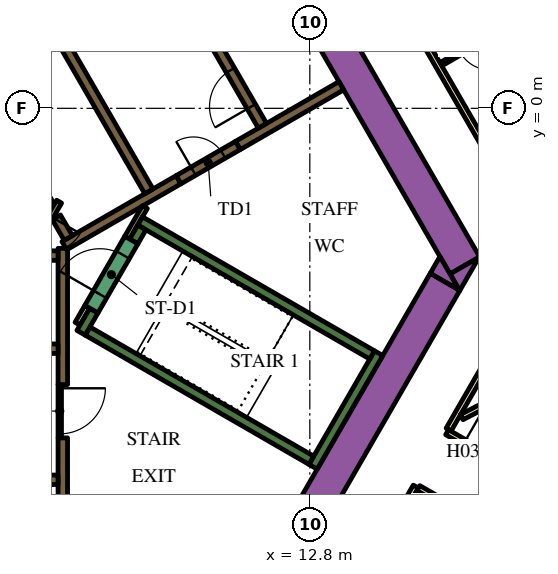
"""IFC4 building model, lengths in metres.
Left out: names, types, materials, properties, quantities, classifications, styles, units other than length and angle.
Written with IfcOpenShell. Run it as: python <this file> out.ifc"""

import sys

from ifc_helpers import new_model, si_unit, direction, frame, frame_2d, origin, place, context, subcontext, project, spatial, polyline, rectangle, outline, extrude, element, fill, save


model = new_model("IFC4")
c1 = context("Model", 3, precision=1e-05, world=origin(), true_north=direction((0.0, 1.0)))
c2 = subcontext(c1, "Body", "Model", "MODEL_VIEW")
j1 = project(units=[si_unit("LENGTHUNIT", "METRE"), si_unit("PLANEANGLEUNIT", "RADIAN")], contexts=[c1])
p1 = place(None, origin())
s1 = spatial("IfcSite", under=j1, at=p1, CompositionType="ELEMENT")
p2 = place(p1, origin())
s2 = spatial("IfcBuilding", under=s1, at=p2, CompositionType="ELEMENT")
p3 = place(p2, frame((0.0, 0.0, 51.0)))
s3 = spatial("IfcBuildingStorey", under=s2, at=p3, CompositionType="ELEMENT", Elevation=51.0)
p4 = place(p3, frame((6.776, 13.364, 0.0), z_axis=(0.0, 0.0, 1.0), x_axis=(0.500004177138, -0.8660229921, 0.0)))
e1 = element("IfcWall", 1, at=p4, inside=s3, PredefinedType="SOLIDWALL", context=c2, shape_type="SweptSolid", body=[
    extrude(rectangle(XDim=20.204, YDim=0.9, at=frame_2d((10.102, 0.0))), origin(), (0.0, 0.0, 1.0), 3.9),
])
p5 = place(p3, origin())
e2 = element("IfcWall", 2, at=p5, inside=s3, PredefinedType="SOLIDWALL", context=c2, shape_type="SweptSolid", body=[
    extrude(outline(polyline([(16.743, -4.8), (16.489, -4.36), (17.251, -3.92), (16.743, -4.8)])), origin(), (0.0, 0.0, 1.0), 3.9),
])
p6 = place(p3, frame((11.943, -12.214, 0.0), z_axis=(0.0, 0.0, 1.0), x_axis=(0.49998092645, 0.866036415623, 0.0)))
e3 = element("IfcWall", 3, at=p6, inside=s3, PredefinedType="SOLIDWALL", context=c2, shape_type="SweptSolid", body=[
    extrude(rectangle(XDim=8.83, YDim=0.9, at=frame_2d((4.415, 0.0))), origin(), (0.0, 0.0, 1.0), 3.9),
])
e4 = element("IfcWall", 4, at=p5, inside=s3, PredefinedType="SOLIDWALL", context=c2, shape_type="SweptSolid", body=[
    extrude(outline(polyline([(16.223, -3.9), (16.732, -4.78), (15.969, -4.34), (16.223, -3.9)])), origin(), (0.0, 0.0, 1.0), 3.9),
])
p7 = place(p3, frame((12.885, -9.431, 0.0), z_axis=(0.0, 0.0, 1.0), x_axis=(0.500020560727, 0.866013532718, 0.0)))
e5 = element("IfcWall", 5, at=p7, inside=s3, PredefinedType="SOLIDWALL", context=c2, shape_type="SweptSolid", body=[
    extrude(rectangle(XDim=3.45, YDim=0.25, at=frame_2d((1.725, 0.0))), origin(), (0.0, 0.0, 1.0), 3.9),
])
p8 = place(p3, frame((12.84, -9.261, 0.0), z_axis=(0.0, 0.0, 1.0), x_axis=(-0.866013990052, 0.500019768644, 0.0)))
e6 = element("IfcWall", 6, at=p8, inside=s3, PredefinedType="SOLIDWALL", context=c2, shape_type="SweptSolid", body=[
    extrude(rectangle(XDim=6.8, YDim=0.25, at=frame_2d((3.4, 0.0))), origin(), (0.0, 0.0, 1.0), 3.9),
])
p9 = place(p3, frame((6.78, -5.906, 0.0), z_axis=(0.0, 0.0, 1.0), x_axis=(0.500223362819, 0.865896406789, 0.0)))
e7 = element("IfcWall", 7, at=p9, inside=s3, PredefinedType="SOLIDWALL", context=c2, shape_type="SweptSolid", body=[
    extrude(rectangle(XDim=0.675, YDim=0.25, at=frame_2d((0.337, 0.0))), origin(), (0.0, 0.0, 1.0), 3.9),
])
p10 = place(p3, frame((8.334, -2.964, 0.0), z_axis=(0.0, 0.0, 1.0), x_axis=(0.866016039709, -0.500016218704, 0.0)))
e8 = element("IfcWall", 8, at=p10, inside=s3, PredefinedType="SOLIDWALL", context=c2, shape_type="SweptSolid", body=[
    extrude(rectangle(XDim=7.05, YDim=0.25, at=frame_2d((3.525, 0.0))), origin(), (0.0, 0.0, 1.0), 3.9),
])
p11 = place(p3, frame((8.168, -3.503, 0.0), z_axis=(0.0, 0.0, 1.0), x_axis=(0.49972245349, 0.866185586049, 0.0)))
e9 = element("IfcWall", 9, at=p11, inside=s3, PredefinedType="SOLIDWALL", context=c2, shape_type="SweptSolid", body=[
    extrude(rectangle(XDim=0.425, YDim=0.25, at=frame_2d((0.212, 0.0))), origin(), (0.0, 0.0, 1.0), 3.9),
])
p12 = place(p3, frame((6.3, -7.27, 0.0), z_axis=(0.0, 0.0, 1.0), x_axis=(0.0, 1.0, 0.0)))
e10 = element("IfcWall", 10, at=p12, inside=s3, PredefinedType="SOLIDWALL", context=c2, shape_type="SweptSolid", body=[
    extrude(rectangle(XDim=3.586, YDim=0.25, at=frame_2d((1.793, 0.0))), origin(), (0.0, 0.0, 1.0), 3.9),
])
p13 = place(p3, frame((6.3, -12.1, 0.0), z_axis=(0.0, 0.0, 1.0), x_axis=(0.0, 1.0, 0.0)))
e11 = element("IfcWall", 11, at=p13, inside=s3, PredefinedType="SOLIDWALL", context=c2, shape_type="SweptSolid", body=[
    extrude(rectangle(XDim=3.428, YDim=0.25, at=frame_2d((1.714, 0.0))), origin(), (0.0, 0.0, 1.0), 3.9),
])
p14 = place(p3, frame((5.538, -3.875, 0.0), z_axis=(0.0, 0.0, 1.0), x_axis=(1.0, 0.0, 0.0)))
e12 = element("IfcWall", 12, at=p14, inside=s3, PredefinedType="SOLIDWALL", context=c2, shape_type="SweptSolid", body=[
    extrude(rectangle(XDim=0.637, YDim=0.25, at=frame_2d((0.318, 0.0))), origin(), (0.0, 0.0, 1.0), 3.9),
])
p15 = place(p3, frame((13.629, 0.594, 0.0), z_axis=(0.0, 0.0, 1.0), x_axis=(-0.86602790099, -0.499995674689, 0.0)))
e13 = element("IfcWall", 13, at=p15, inside=s3, PredefinedType="SOLIDWALL", context=c2, shape_type="SweptSolid", body=[
    extrude(rectangle(XDim=3.146, YDim=0.25, at=frame_2d((1.573, 0.0))), origin(), (0.0, 0.0, 1.0), 3.9),
])
p16 = place(p3, frame((9.346, -1.879, 0.0), z_axis=(0.0, 0.0, 1.0), x_axis=(-0.866048528039, -0.499959945477, 0.0)))
e14 = element("IfcWall", 14, at=p16, inside=s3, PredefinedType="SOLIDWALL", context=c2, shape_type="SweptSolid", body=[
    extrude(rectangle(XDim=3.47, YDim=0.25, at=frame_2d((1.735, 0.0))), origin(), (0.0, 0.0, 1.0), 3.9),
])
p17 = place(p3, frame((6.13, -2.867, 0.0), z_axis=(0.0, 0.0, 1.0), x_axis=(0.500160776593, -0.865932559475, 0.0)))
e15 = element("IfcWall", 15, at=p17, inside=s3, PredefinedType="SOLIDWALL", context=c2, shape_type="SweptSolid", body=[
    extrude(rectangle(XDim=0.627, YDim=0.25, at=frame_2d((0.313, 0.0))), origin(), (0.0, 0.0, 1.0), 3.9),
])
p18 = place(p3, frame((5.97, -2.591, 0.0), z_axis=(0.0, 0.0, 1.0), x_axis=(-0.499994469932, 0.866028596547, 0.0)))
e16 = element("IfcWall", 16, at=p18, inside=s3, PredefinedType="SOLIDWALL", context=c2, shape_type="SweptSolid", body=[
    extrude(rectangle(XDim=10.488, YDim=0.25, at=frame_2d((5.244, 0.0))), origin(), (0.0, 0.0, 1.0), 3.9),
])
p19 = place(p3, frame((6.945, -5.222, 0.0), z_axis=(0.0, 0.0, 1.0), x_axis=(-0.499818422106, -0.866130212453, 0.0)))
e17 = element("IfcWall", 17, at=p19, inside=s3, PredefinedType="PARTITIONING", context=c2, shape_type="SweptSolid", body=[
    extrude(rectangle(XDim=0.514, YDim=0.15, at=frame_2d((0.257, 0.0))), origin(), (0.0, 0.0, 1.0), 2.75),
])
p20 = place(p3, frame((8.459, -2.599, 0.0), z_axis=(0.0, 0.0, 1.0), x_axis=(-0.500041054325, -0.866001699761, 0.0)))
e18 = element("IfcWall", 18, at=p20, inside=s3, PredefinedType="PARTITIONING", context=c2, shape_type="SweptSolid", body=[
    extrude(rectangle(XDim=0.929, YDim=0.15, at=frame_2d((0.464, 0.0))), origin(), (0.0, 0.0, 1.0), 3.9),
])
p21 = place(p3, frame((-6.175, -9.775, 0.0), z_axis=(0.0, 0.0, 1.0), x_axis=(1.0, 0.0, 0.0)))
e19 = element("IfcWall", 19, at=p21, inside=s3, PredefinedType="SOLIDWALL", context=c2, shape_type="SweptSolid", body=[
    extrude(rectangle(XDim=12.35, YDim=0.25, at=frame_2d((6.175, 0.0))), origin(), (0.0, 0.0, 1.0), 3.9),
])
p22 = place(p21, frame((0.585, 0.0, 0.0)))
e20 = element("IfcOpeningElement", 20, at=p22, cuts=e19, PredefinedType="OPENING", context=c2, shape_type="SweptSolid", body=[
    extrude(rectangle(XDim=1.1, YDim=2.1, at=frame_2d((0.55, 1.05))), frame((0.0, 0.135, 0.0), z_axis=(0.0, -1.0, 0.0), x_axis=(1.0, 0.0, 0.0)), (0.0, 0.0, 1.0), 0.27),
])
p23 = place(p21, frame((3.105, 0.0, 0.0)))
e21 = element("IfcOpeningElement", 21, at=p23, cuts=e19, PredefinedType="OPENING", context=c2, shape_type="SweptSolid", body=[
    extrude(rectangle(XDim=1.1, YDim=2.1, at=frame_2d((0.55, 1.05))), frame((0.0, 0.135, 0.0), z_axis=(0.0, -1.0, 0.0), x_axis=(1.0, 0.0, 0.0)), (0.0, 0.0, 1.0), 0.27),
])
p24 = place(p21, frame((5.625, 0.0, 0.0)))
e22 = element("IfcOpeningElement", 22, at=p24, cuts=e19, PredefinedType="OPENING", context=c2, shape_type="SweptSolid", body=[
    extrude(rectangle(XDim=1.1, YDim=2.1, at=frame_2d((0.55, 1.05))), frame((0.0, 0.135, 0.0), z_axis=(0.0, -1.0, 0.0), x_axis=(1.0, 0.0, 0.0)), (0.0, 0.0, 1.0), 0.27),
])
p25 = place(p21, frame((8.145, 0.0, 0.0)))
e23 = element("IfcOpeningElement", 23, at=p25, cuts=e19, PredefinedType="OPENING", context=c2, shape_type="SweptSolid", body=[
    extrude(rectangle(XDim=1.1, YDim=2.1, at=frame_2d((0.55, 1.05))), frame((0.0, 0.135, 0.0), z_axis=(0.0, -1.0, 0.0), x_axis=(1.0, 0.0, 0.0)), (0.0, 0.0, 1.0), 0.27),
])
p26 = place(p21, frame((10.665, 0.0, 0.0)))
e24 = element("IfcOpeningElement", 24, at=p26, cuts=e19, PredefinedType="OPENING", context=c2, shape_type="SweptSolid", body=[
    extrude(rectangle(XDim=1.1, YDim=2.1, at=frame_2d((0.55, 1.05))), frame((0.0, 0.135, 0.0), z_axis=(0.0, -1.0, 0.0), x_axis=(1.0, 0.0, 0.0)), (0.0, 0.0, 1.0), 0.27),
])
p27 = place(p3, frame((-6.175, -6.325, 0.0), z_axis=(0.0, 0.0, 1.0), x_axis=(1.0, 0.0, 0.0)))
e25 = element("IfcWall", 25, at=p27, inside=s3, PredefinedType="SOLIDWALL", context=c2, shape_type="SweptSolid", body=[
    extrude(rectangle(XDim=12.35, YDim=0.25, at=frame_2d((6.175, 0.0))), origin(), (0.0, 0.0, 1.0), 3.9),
])
p28 = place(p27, frame((3.205, 0.0, 0.0)))
e26 = element("IfcOpeningElement", 26, at=p28, cuts=e25, PredefinedType="OPENING", context=c2, shape_type="SweptSolid", body=[
    extrude(rectangle(XDim=0.9, YDim=2.1, at=frame_2d((0.45, 1.05))), frame((0.0, 0.135, 0.0), z_axis=(0.0, -1.0, 0.0), x_axis=(1.0, 0.0, 0.0)), (0.0, 0.0, 1.0), 0.27),
])
p29 = place(p27, frame((8.145, 0.0, 0.0)))
e27 = element("IfcOpeningElement", 27, at=p29, cuts=e25, PredefinedType="OPENING", context=c2, shape_type="SweptSolid", body=[
    extrude(rectangle(XDim=1.1, YDim=2.1, at=frame_2d((0.55, 1.05))), frame((0.0, 0.135, 0.0), z_axis=(0.0, -1.0, 0.0), x_axis=(1.0, 0.0, 0.0)), (0.0, 0.0, 1.0), 0.27),
])
p30 = place(p27, frame((10.665, 0.0, 0.0)))
e28 = element("IfcOpeningElement", 28, at=p30, cuts=e25, PredefinedType="OPENING", context=c2, shape_type="SweptSolid", body=[
    extrude(rectangle(XDim=1.1, YDim=2.1, at=frame_2d((0.55, 1.05))), frame((0.0, 0.135, 0.0), z_axis=(0.0, -1.0, 0.0), x_axis=(1.0, 0.0, 0.0)), (0.0, 0.0, 1.0), 0.27),
])
p31 = place(p3, frame((11.553, -0.46, 0.0), z_axis=(0.0, 0.0, 1.0), x_axis=(-0.500006514828, 0.866021642414, 0.0)))
e29 = element("IfcWall", 29, at=p31, inside=s3, PredefinedType="SOLIDWALL", context=c2, shape_type="SweptSolid", body=[
    extrude(rectangle(XDim=12.35, YDim=0.25, at=frame_2d((6.175, 0.0))), origin(), (0.0, 0.0, 1.0), 3.9),
])
p32 = place(p31, frame((0.585, 0.0, 0.0)))
e30 = element("IfcOpeningElement", 30, at=p32, cuts=e29, PredefinedType="OPENING", context=c2, shape_type="SweptSolid", body=[
    extrude(rectangle(XDim=1.1, YDim=2.1, at=frame_2d((0.55, 1.05))), frame((0.0, 0.135, 0.0), z_axis=(0.0, -1.0, 0.0), x_axis=(1.0, 0.0, 0.0)), (0.0, 0.0, 1.0), 0.27),
])
p33 = place(p31, frame((3.105, 0.0, 0.0)))
e31 = element("IfcOpeningElement", 31, at=p33, cuts=e29, PredefinedType="OPENING", context=c2, shape_type="SweptSolid", body=[
    extrude(rectangle(XDim=1.1, YDim=2.1, at=frame_2d((0.55, 1.05))), frame((0.0, 0.135, 0.0), z_axis=(0.0, -1.0, 0.0), x_axis=(1.0, 0.0, 0.0)), (0.0, 0.0, 1.0), 0.27),
])
p34 = place(p31, frame((5.625, 0.0, 0.0)))
e32 = element("IfcOpeningElement", 32, at=p34, cuts=e29, PredefinedType="OPENING", context=c2, shape_type="SweptSolid", body=[
    extrude(rectangle(XDim=1.1, YDim=2.1, at=frame_2d((0.55, 1.05))), frame((0.0, 0.135, 0.0), z_axis=(0.0, -1.0, 0.0), x_axis=(1.0, 0.0, 0.0)), (0.0, 0.0, 1.0), 0.27),
])
p35 = place(p3, frame((8.565, -2.185, 0.0), z_axis=(0.0, 0.0, 1.0), x_axis=(-0.499997954832, 0.866026584559, 0.0)))
e33 = element("IfcWall", 33, at=p35, inside=s3, PredefinedType="SOLIDWALL", context=c2, shape_type="SweptSolid", body=[
    extrude(rectangle(XDim=12.35, YDim=0.25, at=frame_2d((6.175, 0.0))), origin(), (0.0, 0.0, 1.0), 3.9),
])
p36 = place(p35, frame((5.725, 0.0, 0.0)))
e34 = element("IfcOpeningElement", 34, at=p36, cuts=e33, PredefinedType="OPENING", context=c2, shape_type="SweptSolid", body=[
    extrude(rectangle(XDim=0.9, YDim=2.1, at=frame_2d((0.45, 1.05))), frame((0.0, 0.135, 0.0), z_axis=(0.0, -1.0, 0.0), x_axis=(1.0, 0.0, 0.0)), (0.0, 0.0, 1.0), 0.27),
])
p37 = place(p3, frame((7.053, -5.284, 0.0), z_axis=(0.0, 0.0, 1.0), x_axis=(0.500078061341, 0.865980330357, 0.0)))
e35 = element("IfcWall", 35, at=p37, inside=s3, PredefinedType="SOLIDWALL", context=c2, shape_type="SweptSolid", body=[
    extrude(rectangle(XDim=2.1, YDim=0.4, at=frame_2d((1.05, 0.0))), origin(), (0.0, 0.0, 1.0), 3.9),
])
p38 = place(p37, frame((0.45, 0.0, 0.0)))
e36 = element("IfcOpeningElement", 36, at=p38, cuts=e35, PredefinedType="OPENING", context=c2, shape_type="SweptSolid", body=[
    extrude(rectangle(XDim=1.2, YDim=2.1, at=frame_2d((0.6, 1.05))), frame((0.0, 0.21, 0.0), z_axis=(0.0, -1.0, 0.0), x_axis=(1.0, 0.0, 0.0)), (0.0, 0.0, 1.0), 0.42),
])
p39 = place(p3, frame((9.346, -1.879, 0.0), z_axis=(0.0, 0.0, 1.0), x_axis=(0.866047807691, 0.499961193289, 0.0)))
e37 = element("IfcWall", 37, at=p39, inside=s3, PredefinedType="SOLIDWALL", context=c2, shape_type="SweptSolid", body=[
    extrude(rectangle(XDim=1.8, YDim=0.25, at=frame_2d((0.9, 0.0))), origin(), (0.0, 0.0, 1.0), 3.9),
])
p40 = place(p39, frame((0.45, 0.0, 0.0)))
e38 = element("IfcOpeningElement", 38, at=p40, cuts=e37, PredefinedType="OPENING", context=c2, shape_type="SweptSolid", body=[
    extrude(rectangle(XDim=0.9, YDim=2.1, at=frame_2d((0.45, 1.05))), frame((0.0, 0.135, 0.0), z_axis=(0.0, -1.0, 0.0), x_axis=(1.0, 0.0, 0.0)), (0.0, 0.0, 1.0), 0.27),
])
p41 = place(p3, frame((6.203, -2.456, 0.0), z_axis=(0.0, 0.0, 1.0), x_axis=(-0.500043961785, -0.866000020948, 0.0)))
e39 = element("IfcWall", 39, at=p41, inside=s3, PredefinedType="PARTITIONING", context=c2, shape_type="SweptSolid", body=[
    extrude(rectangle(XDim=1.95, YDim=0.15, at=frame_2d((0.975, 0.0))), origin(), (0.0, 0.0, 1.0), 3.9),
])
p42 = place(p41, frame((0.45, 0.0, 0.0)))
e40 = element("IfcOpeningElement", 40, at=p42, cuts=e39, PredefinedType="OPENING", context=c2, shape_type="SweptSolid", body=[
    extrude(rectangle(XDim=0.9, YDim=2.1, at=frame_2d((0.45, 1.05))), frame((0.0, 0.085, 0.0), z_axis=(0.0, -1.0, 0.0), x_axis=(1.0, 0.0, 0.0)), (0.0, 0.0, 1.0), 0.17),
])
p43 = place(p3, frame((6.22, -7.266, 0.0), z_axis=(0.0, 0.0, 1.0), x_axis=(0.0, -1.0, 0.0)))
e41 = element("IfcWall", 41, at=p43, inside=s3, PredefinedType="PARTITIONING", context=c2, shape_type="SweptSolid", body=[
    extrude(rectangle(XDim=1.4, YDim=0.09, at=frame_2d((0.7, 0.0))), origin(), (0.0, 0.0, 1.0), 2.75),
])
p44 = place(p43, frame((0.1, 0.0, 0.0)))
e42 = element("IfcOpeningElement", 42, at=p44, cuts=e41, PredefinedType="OPENING", context=c2, shape_type="SweptSolid", body=[
    extrude(rectangle(XDim=1.2, YDim=2.1, at=frame_2d((0.6, 1.05))), frame((0.0, 0.055, 0.0), z_axis=(0.0, -1.0, 0.0), x_axis=(1.0, 0.0, 0.0)), (0.0, 0.0, 1.0), 0.11),
])
p45 = place(p3, frame((16.412, -8.523, 0.0), z_axis=(0.0, 0.0, 1.0), x_axis=(0.866022197818, -0.500005552856, 0.0)))
e43 = element("IfcWall", 43, at=p45, inside=s3, PredefinedType="PARTITIONING", context=c2, shape_type="SweptSolid", body=[
    extrude(rectangle(XDim=16.224, YDim=0.15, at=frame_2d((8.112, 0.0))), origin(), (0.0, 0.0, 1.0), 2.75),
])
p46 = place(p45, frame((7.949, 0.0, 0.0)))
e44 = element("IfcOpeningElement", 44, at=p46, cuts=e43, PredefinedType="OPENING", context=c2, shape_type="SweptSolid", body=[
    extrude(rectangle(XDim=1.0, YDim=2.1, at=frame_2d((0.5, 1.05))), frame((0.0, 0.085, 0.0), z_axis=(0.0, -1.0, 0.0), x_axis=(1.0, 0.0, 0.0)), (0.0, 0.0, 1.0), 0.17),
])
p47 = place(p45, frame((0.526, 0.0, 0.0)))
e45 = element("IfcOpeningElement", 45, at=p47, cuts=e43, PredefinedType="OPENING", context=c2, shape_type="SweptSolid", body=[
    extrude(rectangle(XDim=1.0, YDim=2.1, at=frame_2d((0.5, 1.05))), frame((0.0, 0.085, 0.0), z_axis=(0.0, -1.0, 0.0), x_axis=(1.0, 0.0, 0.0)), (0.0, 0.0, 1.0), 0.17),
])
p48 = place(p3, frame((19.081, -3.9, 0.0), z_axis=(0.0, 0.0, 1.0), x_axis=(-0.499974327079, -0.866040225545, 0.0)))
e46 = element("IfcWall", 46, at=p48, inside=s3, PredefinedType="PARTITIONING", context=c2, shape_type="SweptSolid", body=[
    extrude(rectangle(XDim=5.258, YDim=0.15, at=frame_2d((2.629, 0.0))), origin(), (0.0, 0.0, 1.0), 2.75),
])
p49 = place(p3, frame((6.163, 18.475, 0.0), z_axis=(0.0, 0.0, 1.0), x_axis=(0.500001317485, -0.866024643133, 0.0)))
e47 = element("IfcWall", 47, at=p49, inside=s3, PredefinedType="PARTITIONING", context=c2, shape_type="SweptSolid", body=[
    extrude(rectangle(XDim=25.767, YDim=0.15, at=frame_2d((12.883, 0.0))), origin(), (0.0, 0.0, 1.0), 2.75),
])
p50 = place(p49, frame((24.586, 0.0, 0.0)))
e48 = element("IfcOpeningElement", 48, at=p50, cuts=e47, PredefinedType="OPENING", context=c2, shape_type="SweptSolid", body=[
    extrude(rectangle(XDim=1.0, YDim=2.1, at=frame_2d((0.5, 1.05))), frame((0.0, 0.085, 0.0), z_axis=(0.0, -1.0, 0.0), x_axis=(1.0, 0.0, 0.0)), (0.0, 0.0, 1.0), 0.17),
])
p51 = place(p49, frame((13.144, 0.0, 0.0)))
e49 = element("IfcOpeningElement", 49, at=p51, cuts=e47, PredefinedType="OPENING", context=c2, shape_type="SweptSolid", body=[
    extrude(rectangle(XDim=1.0, YDim=2.1, at=frame_2d((0.5, 1.05))), frame((0.0, 0.085, 0.0), z_axis=(0.0, -1.0, 0.0), x_axis=(1.0, 0.0, 0.0)), (0.0, 0.0, 1.0), 0.17),
])
p52 = place(p49, frame((11.692, 0.0, 0.0)))
e50 = element("IfcOpeningElement", 50, at=p52, cuts=e47, PredefinedType="OPENING", context=c2, shape_type="SweptSolid", body=[
    extrude(rectangle(XDim=1.0, YDim=2.1, at=frame_2d((0.5, 1.05))), frame((0.0, 0.085, 0.0), z_axis=(0.0, -1.0, 0.0), x_axis=(1.0, 0.0, 0.0)), (0.0, 0.0, 1.0), 0.17),
])
p53 = place(p49, frame((0.572, 0.0, 0.0)))
e51 = element("IfcOpeningElement", 51, at=p53, cuts=e47, PredefinedType="OPENING", context=c2, shape_type="SweptSolid", body=[
    extrude(rectangle(XDim=1.0, YDim=2.1, at=frame_2d((0.5, 1.05))), frame((0.0, 0.085, 0.0), z_axis=(0.0, -1.0, 0.0), x_axis=(1.0, 0.0, 0.0)), (0.0, 0.0, 1.0), 0.17),
])
p54 = place(p3, frame((15.587, -9.952, 0.0), z_axis=(0.0, 0.0, 1.0), x_axis=(-0.500016618951, -0.866015808616, 0.0)))
e52 = element("IfcWall", 52, at=p54, inside=s3, PredefinedType="PARTITIONING", context=c2, shape_type="SweptSolid", body=[
    extrude(rectangle(XDim=5.268, YDim=0.15, at=frame_2d((2.634, 0.0))), origin(), (0.0, 0.0, 1.0), 2.75),
])
p55 = place(p3, frame((29.638, -18.064, 0.0), z_axis=(0.0, 0.0, 1.0), x_axis=(-0.866026175601, 0.499998663172, 0.0)))
e53 = element("IfcWall", 53, at=p55, inside=s3, PredefinedType="PARTITIONING", context=c2, shape_type="SweptSolid", body=[
    extrude(rectangle(XDim=16.144, YDim=0.15, at=frame_2d((8.072, 0.0))), origin(), (0.0, 0.0, 1.0), 2.75),
])
p56 = place(p55, frame((14.714, 0.0, 0.0)))
e54 = element("IfcOpeningElement", 54, at=p56, cuts=e53, PredefinedType="OPENING", context=c2, shape_type="SweptSolid", body=[
    extrude(rectangle(XDim=1.0, YDim=2.1, at=frame_2d((0.5, 1.05))), frame((0.0, 0.085, 0.0), z_axis=(0.0, -1.0, 0.0), x_axis=(1.0, 0.0, 0.0)), (0.0, 0.0, 1.0), 0.17),
])
p57 = place(p55, frame((7.275, 0.0, 0.0)))
e55 = element("IfcOpeningElement", 55, at=p57, cuts=e53, PredefinedType="OPENING", context=c2, shape_type="SweptSolid", body=[
    extrude(rectangle(XDim=1.0, YDim=2.1, at=frame_2d((0.5, 1.05))), frame((0.0, 0.085, 0.0), z_axis=(0.0, -1.0, 0.0), x_axis=(1.0, 0.0, 0.0)), (0.0, 0.0, 1.0), 0.17),
])
p58 = place(p3, frame((27.134, -2.779, 0.0), z_axis=(0.0, 0.0, 1.0), x_axis=(-0.8882049501, -0.459447457951, 0.0)))
e56 = element("IfcWall", 56, at=p58, inside=s3, PredefinedType="PARTITIONING", context=c2, shape_type="SweptSolid", body=[
    extrude(rectangle(XDim=11.638, YDim=0.15, at=frame_2d((5.819, 0.0))), origin(), (0.0, 0.0, 1.0), 2.75),
])
p59 = place(p3, frame((18.586, 2.509, 0.0), z_axis=(0.0, 0.0, 1.0), x_axis=(-0.866059108428, -0.4999416173, 0.0)))
e57 = element("IfcWall", 57, at=p59, inside=s3, PredefinedType="PARTITIONING", context=c2, shape_type="SweptSolid", body=[
    extrude(rectangle(XDim=2.7, YDim=0.1, at=frame_2d((1.35, 0.0))), origin(), (0.0, 0.0, 1.0), 2.75),
])
p60 = place(p59, frame((1.2, 0.0, 0.0)))
e58 = element("IfcOpeningElement", 58, at=p60, cuts=e57, PredefinedType="OPENING", context=c2, shape_type="SweptSolid", body=[
    extrude(rectangle(XDim=0.9, YDim=2.1, at=frame_2d((0.45, 1.05))), frame((0.0, 0.06, 0.0), z_axis=(0.0, -1.0, 0.0), x_axis=(1.0, 0.0, 0.0)), (0.0, 0.0, 1.0), 0.12),
])
p61 = place(p32, origin())
e59 = element("IfcDoor", 59, at=p61, inside=s3, OperationType="DOUBLE_DOOR_SLIDING", PredefinedType="DOOR", context=c2, shape_type="SweptSolid", body=[
    extrude(rectangle(XDim=1.1, YDim=2.1, at=frame_2d((0.55, 1.05))), frame((0.0, 0.025, 0.0), z_axis=(0.0, -1.0, 0.0), x_axis=(1.0, 0.0, 0.0)), (0.0, 0.0, 1.0), 0.05),
])
fill(e30, e59)
p62 = place(p38, origin())
e60 = element("IfcDoor", 60, at=p62, inside=s3, OperationType="SINGLE_SWING_LEFT", PredefinedType="DOOR", context=c2, shape_type="SweptSolid", body=[
    extrude(rectangle(XDim=1.2, YDim=2.1, at=frame_2d((0.6, 1.05))), frame((0.0, 0.025, 0.0), z_axis=(0.0, -1.0, 0.0), x_axis=(1.0, 0.0, 0.0)), (0.0, 0.0, 1.0), 0.05),
])
fill(e36, e60)
p63 = place(p40, origin())
e61 = element("IfcDoor", 61, at=p63, inside=s3, OperationType="SINGLE_SWING_LEFT", PredefinedType="DOOR", context=c2, shape_type="SweptSolid", body=[
    extrude(rectangle(XDim=0.9, YDim=2.1, at=frame_2d((0.45, 1.05))), frame((0.0, 0.025, 0.0), z_axis=(0.0, -1.0, 0.0), x_axis=(1.0, 0.0, 0.0)), (0.0, 0.0, 1.0), 0.05),
])
fill(e38, e61)
p64 = place(p44, origin())
e62 = element("IfcDoor", 62, at=p64, inside=s3, OperationType="SINGLE_SWING_LEFT", PredefinedType="DOOR", context=c2, shape_type="SweptSolid", body=[
    extrude(rectangle(XDim=1.2, YDim=2.1, at=frame_2d((0.6, 1.05))), frame((0.0, 0.025, 0.0), z_axis=(0.0, -1.0, 0.0), x_axis=(1.0, 0.0, 0.0)), (0.0, 0.0, 1.0), 0.05),
])
fill(e42, e62)
p65 = place(p47, origin())
e63 = element("IfcDoor", 63, at=p65, inside=s3, OperationType="SINGLE_SWING_LEFT", PredefinedType="DOOR", context=c2, shape_type="SweptSolid", body=[
    extrude(rectangle(XDim=1.0, YDim=2.1, at=frame_2d((0.5, 1.05))), frame((0.0, 0.025, 0.0), z_axis=(0.0, -1.0, 0.0), x_axis=(1.0, 0.0, 0.0)), (0.0, 0.0, 1.0), 0.05),
])
fill(e45, e63)
p66 = place(p60, origin())
e64 = element("IfcDoor", 64, at=p66, inside=s3, OperationType="SINGLE_SWING_RIGHT", PredefinedType="DOOR", context=c2, shape_type="SweptSolid", body=[
    extrude(rectangle(XDim=0.9, YDim=2.1, at=frame_2d((0.45, 1.05))), frame((0.0, 0.025, 0.0), z_axis=(0.0, -1.0, 0.0), x_axis=(1.0, 0.0, 0.0)), (0.0, 0.0, 1.0), 0.05),
])
fill(e58, e64)
save(model, sys.argv[1])
